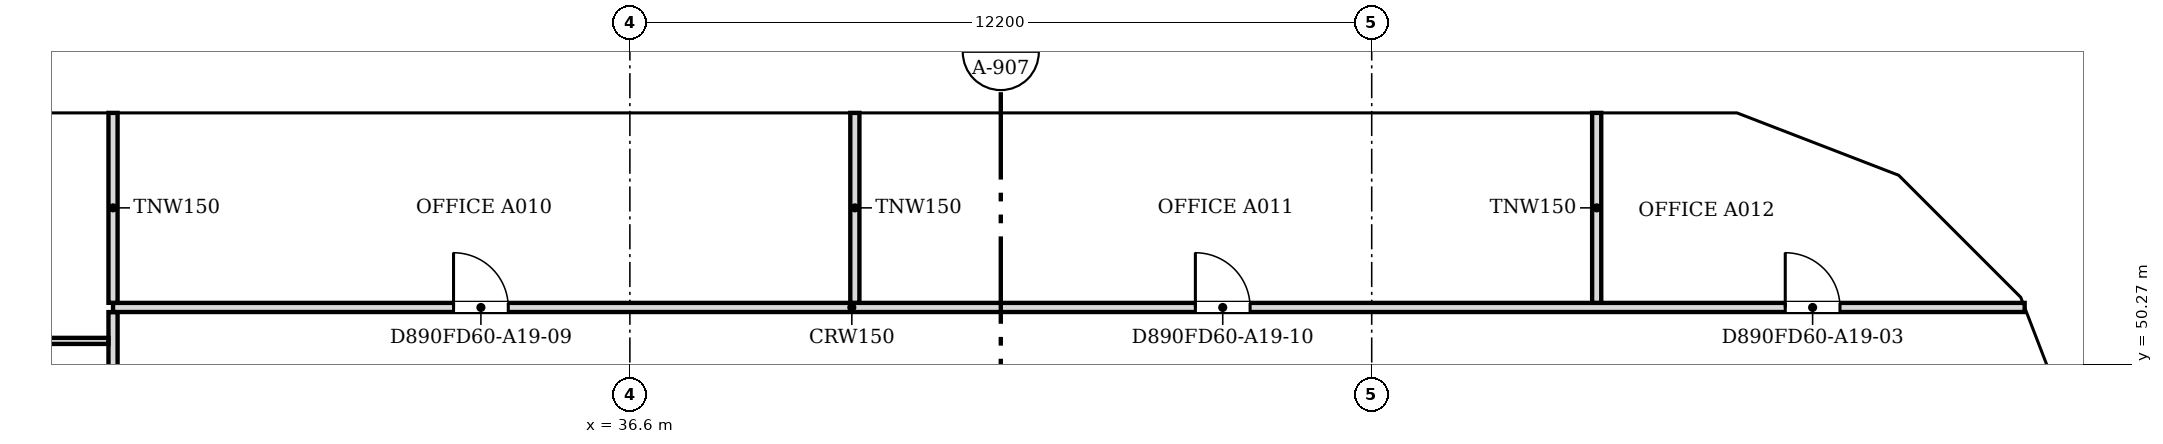
"""IFC4 building model, lengths in metres.
Left out: names, types, materials, properties, quantities, classifications, styles, units other than length and angle.
Written with IfcOpenShell. Run it as: python <this file> out.ifc"""

import sys

from ifc_helpers import new_model, si_unit, direction, frame, frame_2d, origin, place, context, subcontext, project, spatial, polyline, rectangle, outline, extrude, faceted_brep, source, transform, mapped, element, fill, save


model = new_model("IFC4")
c1 = context("Model", 3, precision=1e-05, world=origin(), true_north=direction((0.0, 1.0)))
c2 = subcontext(c1, "Body", "Model", "MODEL_VIEW")
j1 = project(units=[si_unit("LENGTHUNIT", "METRE"), si_unit("PLANEANGLEUNIT", "RADIAN")], contexts=[c1])
p1 = place(None, origin())
s1 = spatial("IfcSite", under=j1, at=p1, CompositionType="ELEMENT")
p2 = place(p1, origin())
s2 = spatial("IfcBuilding", under=s1, at=p2, CompositionType="ELEMENT")
p3 = place(p2, frame((0.0, 0.0, 216.9)))
s3 = spatial("IfcBuildingStorey", under=s2, at=p3, CompositionType="ELEMENT", Elevation=216.9)
m1 = source(origin(), c2, "Body", "Brep", [
    faceted_brep([(0.047, -0.25, 0.0), (2.997, -0.25, 3.8), (0.047, -0.25, 7.6), (0.0, -0.25, 7.541), (0.0, -0.25, 0.059), (0.093, 0.25, 7.54), (2.944, 0.25, 3.868), (2.944, 0.25, 3.732), (0.093, 0.25, 0.06), (2.997, 0.0, 3.8), (0.047, 0.0, 0.0), (0.047, 0.0, 7.6)], [[[0, 1, 2, 3, 4]], [[5, 6, 7, 8]], [[8, 7, 9, 1, 0, 10]], [[6, 5, 11, 2, 1, 9]], [[3, 2, 11]], [[10, 0, 4]], [[8, 10, 4, 3, 11, 5]], [[9, 7, 6]]]),
])
p4 = place(p3, frame((60.767, 48.71, -3.8), z_axis=(0.0, 0.0, 1.0), x_axis=(-0.359901446078, 0.932990326376, 0.0)))
e1 = element("IfcWall", 1, at=p4, inside=s3, PredefinedType="SOLIDWALL", context=c2, shape_type="MappedRepresentation", body=[
    mapped(m1, transform((0.0, 0.0, 0.0), scale=1.0)),
])
m2 = source(origin(), c2, "Body", "SweptSolid", [
    extrude(outline(polyline([(0.247, 0.665), (2.681, 3.8), (0.247, 6.935), (0.247, 0.665)])), frame((0.0, 0.26, 0.0), z_axis=(0.0, -1.0, 0.0), x_axis=(1.0, 0.0, 0.0)), (0.0, 0.0, 1.0), 0.52),
])
p5 = place(p4, origin())
e2 = element("IfcOpeningElement", 2, at=p5, cuts=e1, PredefinedType="OPENING", context=c2, shape_type="MappedRepresentation", body=[
    mapped(m2, transform((0.0, 0.0, 0.0), scale=1.0)),
])
m3 = source(origin(), c2, "Body", "Brep", [
    faceted_brep([(2.944, -0.25, 0.0), (2.997, -0.25, 0.068), (2.997, -0.25, 7.532), (2.944, -0.25, 7.6), (0.0, -0.25, 3.8), (0.053, 0.25, 3.868), (2.891, 0.25, 7.532), (2.891, 0.25, 0.068), (0.053, 0.25, 3.731), (2.944, 0.0, 0.0), (2.944, 0.0, 7.6), (0.0, 0.0, 3.8)], [[[0, 1, 2, 3, 4]], [[5, 6, 7, 8]], [[1, 0, 9]], [[10, 3, 2]], [[6, 5, 11, 4, 3, 10]], [[8, 7, 9, 0, 4, 11]], [[8, 11, 5]], [[1, 9, 7, 6, 10, 2]]]),
])
p6 = place(p3, frame((59.688, 51.506, -3.8), z_axis=(0.0, 0.0, 1.0), x_axis=(-0.707106781187, 0.707106781187, 0.0)))
e3 = element("IfcWall", 3, at=p6, inside=s3, PredefinedType="SOLIDWALL", context=c2, shape_type="MappedRepresentation", body=[
    mapped(m3, transform((0.0, 0.0, 0.0), scale=1.0)),
])
m4 = source(origin(), c2, "Body", "SweptSolid", [
    extrude(outline(polyline([(2.744, 6.934), (0.316, 3.8), (2.744, 0.666), (2.744, 6.934)])), frame((0.0, 0.26, 0.0), z_axis=(0.0, -1.0, 0.0), x_axis=(1.0, 0.0, 0.0)), (0.0, 0.0, 1.0), 0.52),
])
p7 = place(p6, origin())
e4 = element("IfcOpeningElement", 4, at=p7, cuts=e3, PredefinedType="OPENING", context=c2, shape_type="MappedRepresentation", body=[
    mapped(m4, transform((0.0, 0.0, 0.0), scale=1.0)),
])
m5 = source(origin(), c2, "Body", "Brep", [
    faceted_brep([(0.053, -0.25, 0.0), (3.003, -0.25, 3.8), (0.053, -0.25, 7.6), (0.0, -0.25, 7.531), (0.0, -0.25, 0.068), (0.106, 0.25, 7.532), (2.957, 0.25, 3.86), (2.957, 0.25, 3.74), (0.106, 0.25, 0.068), (3.003, 0.0, 3.8), (0.053, 0.0, 0.0), (0.053, 0.0, 7.6)], [[[0, 1, 2, 3, 4]], [[5, 6, 7, 8]], [[8, 7, 9, 1, 0, 10]], [[6, 5, 11, 2, 1, 9]], [[3, 2, 11]], [[10, 0, 4]], [[8, 10, 4, 3, 11, 5]], [[9, 7, 6]]]),
])
p8 = place(p3, frame((57.656, 53.569, -3.8), z_axis=(0.0, 0.0, 1.0), x_axis=(-0.933007896601, 0.359855894603, 0.0)))
e5 = element("IfcWall", 5, at=p8, inside=s3, PredefinedType="SOLIDWALL", context=c2, shape_type="MappedRepresentation", body=[
    mapped(m5, transform((0.0, 0.0, 0.0), scale=1.0)),
])
m6 = source(origin(), c2, "Body", "SweptSolid", [
    extrude(outline(polyline([(0.253, 0.665), (2.687, 3.8), (0.253, 6.935), (0.253, 0.665)])), frame((0.0, 0.26, 0.0), z_axis=(0.0, -1.0, 0.0), x_axis=(1.0, 0.0, 0.0)), (0.0, 0.0, 1.0), 0.52),
])
p9 = place(p8, origin())
e6 = element("IfcOpeningElement", 6, at=p9, cuts=e5, PredefinedType="OPENING", context=c2, shape_type="MappedRepresentation", body=[
    mapped(m6, transform((0.0, 0.0, 0.0), scale=1.0)),
])
m7 = source(origin(), c2, "Body", "Brep", [
    faceted_brep([(3.003, -0.25, 0.0), (6.053, -0.25, 3.8), (3.003, -0.25, 7.6), (0.0, -0.25, 3.8), (0.047, 0.25, 3.859), (3.003, 0.25, 7.6), (6.053, 0.25, 3.8), (3.003, 0.25, 0.0), (0.047, 0.25, 3.741), (0.0, 0.0, 3.8)], [[[0, 1, 2, 3]], [[4, 5, 6, 7, 8]], [[7, 6, 1, 0]], [[6, 5, 2, 1]], [[5, 4, 9, 3, 2]], [[8, 7, 0, 3, 9]], [[8, 9, 4]]]),
])
p10 = place(p3, frame((54.854, 54.65, -3.8), z_axis=(0.0, 0.0, 1.0), x_axis=(-1.0, 0.0, 0.0)))
e7 = element("IfcWall", 7, at=p10, inside=s3, PredefinedType="SOLIDWALL", context=c2, shape_type="MappedRepresentation", body=[
    mapped(m7, transform((0.0, 0.0, 0.0), scale=1.0)),
])
m8 = source(origin(), c2, "Body", "SweptSolid", [
    extrude(outline(polyline([(3.005, 0.401), (5.733, 3.8), (3.005, 7.199), (0.319, 3.8), (3.005, 0.401)])), frame((0.0, 0.26, 0.0), z_axis=(0.0, -1.0, 0.0), x_axis=(1.0, 0.0, 0.0)), (0.0, 0.0, 1.0), 0.52),
])
p11 = place(p10, origin())
e8 = element("IfcOpeningElement", 8, at=p11, cuts=e7, PredefinedType="OPENING", context=c2, shape_type="MappedRepresentation", body=[
    mapped(m8, transform((0.0, 0.0, 0.0), scale=1.0)),
])
m9 = source(origin(), c2, "Body", "SweptSolid", [
    extrude(outline(polyline([(3.05, 0.0), (6.1, 3.8), (3.05, 7.6), (0.0, 3.8), (3.05, 0.0)])), frame((0.0, 0.25, 0.0), z_axis=(0.0, -1.0, 0.0), x_axis=(1.0, 0.0, 0.0)), (0.0, 0.0, 1.0), 0.5),
])
p12 = place(p3, frame((48.8, 54.65, -3.8), z_axis=(0.0, 0.0, 1.0), x_axis=(-1.0, 0.0, 0.0)))
e9 = element("IfcWall", 9, at=p12, inside=s3, PredefinedType="SOLIDWALL", context=c2, shape_type="MappedRepresentation", body=[
    mapped(m9, transform((0.0, 0.0, 0.0), scale=1.0)),
])
m10 = source(origin(), c2, "Body", "SweptSolid", [
    extrude(outline(polyline([(3.05, 0.399), (5.78, 3.8), (3.05, 7.2), (0.321, 3.8), (3.05, 0.399)])), frame((0.0, 0.26, 0.0), z_axis=(0.0, -1.0, 0.0), x_axis=(1.0, 0.0, 0.0)), (0.0, 0.0, 1.0), 0.52),
])
p13 = place(p12, origin())
e10 = element("IfcOpeningElement", 10, at=p13, cuts=e9, PredefinedType="OPENING", context=c2, shape_type="MappedRepresentation", body=[
    mapped(m10, transform((0.0, 0.0, 0.0), scale=1.0)),
])
m11 = source(origin(), c2, "Body", "Brep", [
    faceted_brep([(3.05, -0.25, 0.0), (6.1, -0.25, 3.8), (6.1, -0.25, 3.8), (3.05, -0.25, 7.6), (0.0, -0.25, 3.8), (0.0, 0.25, 3.8), (3.05, 0.25, 7.6), (6.1, 0.25, 3.8), (6.1, 0.25, 3.8), (3.05, 0.25, 0.0)], [[[0, 1, 2, 3, 4]], [[5, 6, 7, 8, 9]], [[9, 8, 1, 0]], [[7, 6, 3, 2]], [[6, 5, 4, 3]], [[5, 9, 0, 4]], [[1, 8, 7, 2]]]),
])
p14 = place(p3, frame((42.7, 54.65, -3.8), z_axis=(0.0, 0.0, 1.0), x_axis=(-1.0, 0.0, 0.0)))
e11 = element("IfcWall", 11, at=p14, inside=s3, PredefinedType="SOLIDWALL", context=c2, shape_type="MappedRepresentation", body=[
    mapped(m11, transform((0.0, 0.0, 0.0), scale=1.0)),
])
p15 = place(p14, origin())
e12 = element("IfcOpeningElement", 12, at=p15, cuts=e11, PredefinedType="OPENING", context=c2, shape_type="MappedRepresentation", body=[
    mapped(m10, transform((0.0, 0.0, 0.0), scale=1.0)),
])
p16 = place(p3, frame((36.6, 54.65, -3.8), z_axis=(0.0, 0.0, 1.0), x_axis=(-1.0, 0.0, 0.0)))
e13 = element("IfcWall", 13, at=p16, inside=s3, PredefinedType="SOLIDWALL", context=c2, shape_type="MappedRepresentation", body=[
    mapped(m9, transform((0.0, 0.0, 0.0), scale=1.0)),
])
p17 = place(p16, origin())
e14 = element("IfcOpeningElement", 14, at=p17, cuts=e13, PredefinedType="OPENING", context=c2, shape_type="MappedRepresentation", body=[
    mapped(m10, transform((0.0, 0.0, 0.0), scale=1.0)),
])
p18 = place(p3, frame((30.5, 54.65, -3.8), z_axis=(0.0, 0.0, 1.0), x_axis=(-1.0, 0.0, 0.0)))
e15 = element("IfcWall", 15, at=p18, inside=s3, PredefinedType="SOLIDWALL", context=c2, shape_type="MappedRepresentation", body=[
    mapped(m9, transform((0.0, 0.0, 0.0), scale=1.0)),
])
p19 = place(p18, origin())
e16 = element("IfcOpeningElement", 16, at=p19, cuts=e15, PredefinedType="OPENING", context=c2, shape_type="MappedRepresentation", body=[
    mapped(m10, transform((0.0, 0.0, 0.0), scale=1.0)),
])
p20 = place(p2, frame((0.0, 0.0, 220.7)))
s4 = spatial("IfcBuildingStorey", under=s2, at=p20, CompositionType="ELEMENT", Elevation=220.7)
m12 = source(origin(), c2, "Body", "Brep", [
    faceted_brep([(2.95, -0.25, 0.0), (3.003, -0.25, 0.068), (3.003, -0.25, 7.532), (2.95, -0.25, 7.6), (0.0, -0.25, 3.8), (0.047, 0.25, 3.86), (2.898, 0.25, 7.532), (2.898, 0.25, 0.068), (0.047, 0.25, 3.74), (2.95, 0.0, 0.0), (2.95, 0.0, 7.6), (0.0, 0.0, 3.8)], [[[0, 1, 2, 3, 4]], [[5, 6, 7, 8]], [[1, 0, 9]], [[10, 3, 2]], [[6, 5, 11, 4, 3, 10]], [[8, 7, 9, 0, 4, 11]], [[8, 11, 5]], [[1, 9, 7, 6, 10, 2]]]),
])
p21 = place(p20, frame((60.75, 48.753, -3.8), z_axis=(0.0, 0.0, 1.0), x_axis=(-0.35992665181, 0.932980602862, 0.0)))
e17 = element("IfcWall", 17, at=p21, inside=s4, PredefinedType="SOLIDWALL", context=c2, shape_type="MappedRepresentation", body=[
    mapped(m12, transform((0.0, 0.0, 0.0), scale=1.0)),
])
m13 = source(origin(), c2, "Body", "SweptSolid", [
    extrude(outline(polyline([(2.75, 6.935), (0.316, 3.8), (2.75, 0.665), (2.75, 6.935)])), frame((0.0, 0.26, 0.0), z_axis=(0.0, -1.0, 0.0), x_axis=(1.0, 0.0, 0.0)), (0.0, 0.0, 1.0), 0.52),
])
p22 = place(p21, origin())
e18 = element("IfcOpeningElement", 18, at=p22, cuts=e17, PredefinedType="OPENING", context=c2, shape_type="MappedRepresentation", body=[
    mapped(m13, transform((0.0, 0.0, 0.0), scale=1.0)),
])
m14 = source(origin(), c2, "Body", "Brep", [
    faceted_brep([(0.053, -0.25, 0.0), (2.997, -0.25, 3.8), (0.053, -0.25, 7.6), (0.0, -0.25, 7.532), (0.0, -0.25, 0.068), (0.106, 0.25, 7.532), (2.944, 0.25, 3.868), (2.944, 0.25, 3.732), (0.106, 0.25, 0.068), (2.997, 0.0, 3.8), (0.053, 0.0, 0.0), (0.053, 0.0, 7.6)], [[[0, 1, 2, 3, 4]], [[5, 6, 7, 8]], [[8, 7, 9, 1, 0, 10]], [[6, 5, 11, 2, 1, 9]], [[3, 2, 11]], [[10, 0, 4]], [[8, 10, 4, 3, 11, 5]], [[9, 7, 6]]]),
])
p23 = place(p20, frame((59.726, 51.469, -3.8), z_axis=(0.0, 0.0, 1.0), x_axis=(-0.707106781187, 0.707106781187, 0.0)))
e19 = element("IfcWall", 19, at=p23, inside=s4, PredefinedType="SOLIDWALL", context=c2, shape_type="MappedRepresentation", body=[
    mapped(m14, transform((0.0, 0.0, 0.0), scale=1.0)),
])
m15 = source(origin(), c2, "Body", "SweptSolid", [
    extrude(outline(polyline([(0.253, 0.667), (2.681, 3.8), (0.253, 6.934), (0.253, 0.667)])), frame((0.0, 0.26, 0.0), z_axis=(0.0, -1.0, 0.0), x_axis=(1.0, 0.0, 0.0)), (0.0, 0.0, 1.0), 0.52),
])
p24 = place(p23, origin())
e20 = element("IfcOpeningElement", 20, at=p24, cuts=e19, PredefinedType="OPENING", context=c2, shape_type="MappedRepresentation", body=[
    mapped(m15, transform((0.0, 0.0, 0.0), scale=1.0)),
])
m16 = source(origin(), c2, "Body", "Brep", [
    faceted_brep([(2.95, -0.25, 0.0), (2.997, -0.25, 0.059), (2.997, -0.25, 7.541), (2.95, -0.25, 7.6), (0.0, -0.25, 3.8), (0.053, 0.25, 3.868), (2.904, 0.25, 7.54), (2.904, 0.25, 0.06), (0.053, 0.25, 3.732), (2.95, 0.0, 0.0), (2.95, 0.0, 7.6), (0.0, 0.0, 3.8)], [[[0, 1, 2, 3, 4]], [[5, 6, 7, 8]], [[1, 0, 9]], [[10, 3, 2]], [[6, 5, 11, 4, 3, 10]], [[8, 7, 9, 0, 4, 11]], [[8, 11, 5]], [[1, 9, 7, 6, 10, 2]]]),
])
p25 = place(p20, frame((57.606, 53.588, -3.8), z_axis=(0.0, 0.0, 1.0), x_axis=(-0.932990326376, 0.359901446078, 0.0)))
e21 = element("IfcWall", 21, at=p25, inside=s4, PredefinedType="SOLIDWALL", context=c2, shape_type="MappedRepresentation", body=[
    mapped(m16, transform((0.0, 0.0, 0.0), scale=1.0)),
])
p26 = place(p25, origin())
e22 = element("IfcOpeningElement", 22, at=p26, cuts=e21, PredefinedType="OPENING", context=c2, shape_type="MappedRepresentation", body=[
    mapped(m13, transform((0.0, 0.0, 0.0), scale=1.0)),
])
m17 = source(origin(), c2, "Body", "Brep", [
    faceted_brep([(0.047, -0.25, 0.0), (3.05, -0.25, 3.8), (0.047, -0.25, 7.6), (0.0, -0.25, 7.54), (0.0, -0.25, 0.06), (0.093, 0.25, 7.541), (3.05, 0.25, 3.8), (0.093, 0.25, 0.059), (0.047, 0.0, 0.0), (0.047, 0.0, 7.6)], [[[0, 1, 2, 3, 4]], [[5, 6, 7]], [[7, 6, 1, 0, 8]], [[6, 5, 9, 2, 1]], [[3, 2, 9]], [[8, 0, 4]], [[7, 8, 4, 3, 9, 5]]]),
])
p27 = place(p20, frame((54.9, 54.65, -3.8), z_axis=(0.0, 0.0, 1.0), x_axis=(-1.0, 0.0, 0.0)))
e23 = element("IfcWall", 23, at=p27, inside=s4, PredefinedType="SOLIDWALL", context=c2, shape_type="MappedRepresentation", body=[
    mapped(m17, transform((0.0, 0.0, 0.0), scale=1.0)),
])
m18 = source(origin(), c2, "Body", "SweptSolid", [
    extrude(outline(polyline([(0.247, 0.656), (2.731, 3.8), (0.247, 6.944), (0.247, 0.656)])), frame((0.0, 0.26, 0.0), z_axis=(0.0, -1.0, 0.0), x_axis=(1.0, 0.0, 0.0)), (0.0, 0.0, 1.0), 0.52),
])
p28 = place(p27, origin())
e24 = element("IfcOpeningElement", 24, at=p28, cuts=e23, PredefinedType="OPENING", context=c2, shape_type="MappedRepresentation", body=[
    mapped(m18, transform((0.0, 0.0, 0.0), scale=1.0)),
])
m19 = source(origin(), c2, "Body", "SweptSolid", [
    extrude(outline(polyline([(3.05, 0.0), (6.1, 3.8), (3.05, 7.6), (0.0, 3.8), (3.05, 0.0)])), frame((0.0, 0.25, 0.0), z_axis=(0.0, -1.0, 0.0), x_axis=(1.0, 0.0, 0.0)), (0.0, 0.0, 1.0), 0.5),
])
p29 = place(p20, frame((51.85, 54.65, -3.8), z_axis=(0.0, 0.0, 1.0), x_axis=(-1.0, 0.0, 0.0)))
e25 = element("IfcWall", 25, at=p29, inside=s4, PredefinedType="SOLIDWALL", context=c2, shape_type="MappedRepresentation", body=[
    mapped(m19, transform((0.0, 0.0, 0.0), scale=1.0)),
])
m20 = source(origin(), c2, "Body", "SweptSolid", [
    extrude(outline(polyline([(3.05, 0.399), (5.78, 3.8), (3.05, 7.201), (0.321, 3.8), (3.05, 0.399)])), frame((0.0, 0.26, 0.0), z_axis=(0.0, -1.0, 0.0), x_axis=(1.0, 0.0, 0.0)), (0.0, 0.0, 1.0), 0.52),
])
p30 = place(p29, origin())
e26 = element("IfcOpeningElement", 26, at=p30, cuts=e25, PredefinedType="OPENING", context=c2, shape_type="MappedRepresentation", body=[
    mapped(m20, transform((0.0, 0.0, 0.0), scale=1.0)),
])
p31 = place(p20, frame((45.75, 54.65, -3.8), z_axis=(0.0, 0.0, 1.0), x_axis=(-1.0, 0.0, 0.0)))
e27 = element("IfcWall", 27, at=p31, inside=s4, PredefinedType="SOLIDWALL", context=c2, shape_type="MappedRepresentation", body=[
    mapped(m19, transform((0.0, 0.0, 0.0), scale=1.0)),
])
p32 = place(p31, origin())
e28 = element("IfcOpeningElement", 28, at=p32, cuts=e27, PredefinedType="OPENING", context=c2, shape_type="MappedRepresentation", body=[
    mapped(m20, transform((0.0, 0.0, 0.0), scale=1.0)),
])
m21 = source(origin(), c2, "Body", "Brep", [
    faceted_brep([(3.05, -0.25, 0.0), (6.1, -0.25, 3.8), (6.1, -0.25, 3.8), (3.05, -0.25, 7.6), (0.0, -0.25, 3.8), (0.0, 0.25, 3.8), (3.05, 0.25, 7.6), (6.1, 0.25, 3.8), (6.1, 0.25, 3.8), (3.05, 0.25, 0.0)], [[[0, 1, 2, 3, 4]], [[5, 6, 7, 8, 9]], [[9, 8, 1, 0]], [[7, 6, 3, 2]], [[6, 5, 4, 3]], [[5, 9, 0, 4]], [[1, 8, 7, 2]]]),
])
p33 = place(p20, frame((39.65, 54.65, -3.8), z_axis=(0.0, 0.0, 1.0), x_axis=(-1.0, 0.0, 0.0)))
e29 = element("IfcWall", 29, at=p33, inside=s4, PredefinedType="SOLIDWALL", context=c2, shape_type="MappedRepresentation", body=[
    mapped(m21, transform((0.0, 0.0, 0.0), scale=1.0)),
])
p34 = place(p33, origin())
e30 = element("IfcOpeningElement", 30, at=p34, cuts=e29, PredefinedType="OPENING", context=c2, shape_type="MappedRepresentation", body=[
    mapped(m20, transform((0.0, 0.0, 0.0), scale=1.0)),
])
p35 = place(p20, frame((33.55, 54.65, -3.8), z_axis=(0.0, 0.0, 1.0), x_axis=(-1.0, 0.0, 0.0)))
e31 = element("IfcWall", 31, at=p35, inside=s4, PredefinedType="SOLIDWALL", context=c2, shape_type="MappedRepresentation", body=[
    mapped(m19, transform((0.0, 0.0, 0.0), scale=1.0)),
])
p36 = place(p35, origin())
e32 = element("IfcOpeningElement", 32, at=p36, cuts=e31, PredefinedType="OPENING", context=c2, shape_type="MappedRepresentation", body=[
    mapped(m20, transform((0.0, 0.0, 0.0), scale=1.0)),
])
p37 = place(p20, frame((27.45, 54.65, -3.8), z_axis=(0.0, 0.0, 1.0), x_axis=(-1.0, 0.0, 0.0)))
e33 = element("IfcWall", 33, at=p37, inside=s4, PredefinedType="SOLIDWALL", context=c2, shape_type="MappedRepresentation", body=[
    mapped(m21, transform((0.0, 0.0, 0.0), scale=1.0)),
])
p38 = place(p37, origin())
e34 = element("IfcOpeningElement", 34, at=p38, cuts=e33, PredefinedType="OPENING", context=c2, shape_type="MappedRepresentation", body=[
    mapped(m20, transform((0.0, 0.0, 0.0), scale=1.0)),
])
p39 = place(p3, frame((28.1, 47.376, 0.0), z_axis=(0.0, 0.0, 1.0), x_axis=(0.0, 1.0, 0.0)))
e35 = element("IfcWall", 35, at=p39, inside=s3, PredefinedType="PARTITIONING", context=c2, shape_type="SweptSolid", body=[
    extrude(rectangle(XDim=3.748, YDim=0.15, at=frame_2d((1.874, 0.0))), origin(), (0.0, 0.0, 1.0), 3.067),
])
p40 = place(p3, frame((19.776, 50.65, 0.0), z_axis=(0.0, 0.0, 1.0), x_axis=(1.0, 0.0, 0.0)))
e36 = element("IfcWall", 36, at=p40, inside=s3, PredefinedType="PARTITIONING", context=c2, shape_type="SweptSolid", body=[
    extrude(rectangle(XDim=8.248, YDim=0.1, at=frame_2d((4.124, 0.0))), origin(), (0.0, 0.0, 1.0), 3.067),
])
m22 = source(origin(), c2, "Body", "SweptSolid", [
    extrude(rectangle(XDim=0.9, YDim=2.1, at=frame_2d((0.45, 1.05))), frame((0.0, 0.06, 0.0), z_axis=(0.0, -1.0, 0.0), x_axis=(1.0, 0.0, 0.0)), (0.0, 0.0, 1.0), 0.12),
])
p41 = place(p40, frame((3.7, 0.0, 0.0)))
e37 = element("IfcOpeningElement", 37, at=p41, cuts=e36, PredefinedType="OPENING", context=c2, shape_type="MappedRepresentation", body=[
    mapped(m22, transform((0.0, 0.0, 0.0), scale=1.0)),
])
p42 = place(p3, frame((28.1, 51.2, 0.0), z_axis=(0.0, 0.0, 1.0), x_axis=(1.0, 0.0, 0.0)))
e38 = element("IfcWall", 38, at=p42, inside=s3, PredefinedType="PARTITIONING", context=c2, shape_type="SweptSolid", body=[
    extrude(rectangle(XDim=31.438, YDim=0.15, at=frame_2d((15.719, 0.0))), origin(), (0.0, 0.0, 1.0), 3.067),
])
m23 = source(origin(), c2, "Body", "SweptSolid", [
    extrude(rectangle(XDim=0.9, YDim=2.1, at=frame_2d((0.45, 1.05))), frame((0.0, 0.085, 0.0), z_axis=(0.0, -1.0, 0.0), x_axis=(1.0, 0.0, 0.0)), (0.0, 0.0, 1.0), 0.17),
])
p43 = place(p42, frame((27.501, 0.0, 0.0)))
e39 = element("IfcOpeningElement", 39, at=p43, cuts=e38, PredefinedType="OPENING", context=c2, shape_type="MappedRepresentation", body=[
    mapped(m23, transform((0.0, 0.0, 0.0), scale=1.0)),
])
p44 = place(p42, frame((5.6, 0.0, 0.0)))
e40 = element("IfcOpeningElement", 40, at=p44, cuts=e38, PredefinedType="OPENING", context=c2, shape_type="MappedRepresentation", body=[
    mapped(m23, transform((0.0, 0.0, 0.0), scale=1.0)),
])
p45 = place(p42, frame((17.8, 0.0, 0.0)))
e41 = element("IfcOpeningElement", 41, at=p45, cuts=e38, PredefinedType="OPENING", context=c2, shape_type="MappedRepresentation", body=[
    mapped(m23, transform((0.0, 0.0, 0.0), scale=1.0)),
])
for number, where, z_axis, x_axis in (
    (42, (28.1, 51.276, 0.0), (0.0, 0.0, 1.0), (0.0, 1.0, 0.0)),
    (43, (40.3, 51.276, 0.0), (0.0, 0.0, 1.0), (0.0, 1.0, 0.0)),
    (44, (52.5, 51.276, 0.0), (0.0, 0.0, 1.0), (0.0, 1.0, 0.0)),
):
    element("IfcWall", number, at=place(p3, frame(where, z_axis=z_axis, x_axis=x_axis)), inside=s3, PredefinedType="PARTITIONING", context=c2, shape_type="SweptSolid", body=[
        extrude(rectangle(XDim=3.124, YDim=0.15, at=frame_2d((1.562, 0.0))), origin(), (0.0, 0.0, 1.0), 3.067),
    ])
m24 = source(origin(), c2, "Body", "SweptSolid", [
    extrude(rectangle(XDim=0.9, YDim=2.1, at=frame_2d((0.45, 1.05))), frame((0.0, 0.025, 0.0), z_axis=(0.0, -1.0, 0.0), x_axis=(1.0, 0.0, 0.0)), (0.0, 0.0, 1.0), 0.05),
])
p46 = place(p43, origin())
e45 = element("IfcDoor", 45, at=p46, inside=s3, OperationType="SINGLE_SWING_LEFT", PredefinedType="DOOR", context=c2, shape_type="MappedRepresentation", body=[
    mapped(m24, transform((0.0, 0.0, 0.0), scale=1.0)),
])
fill(e39, e45)
p47 = place(p44, origin())
e46 = element("IfcDoor", 46, at=p47, inside=s3, OperationType="SINGLE_SWING_LEFT", PredefinedType="DOOR", context=c2, shape_type="MappedRepresentation", body=[
    mapped(m24, transform((0.0, 0.0, 0.0), scale=1.0)),
])
fill(e40, e46)
p48 = place(p45, origin())
e47 = element("IfcDoor", 47, at=p48, inside=s3, OperationType="SINGLE_SWING_LEFT", PredefinedType="DOOR", context=c2, shape_type="MappedRepresentation", body=[
    mapped(m24, transform((0.0, 0.0, 0.0), scale=1.0)),
])
fill(e41, e47)
save(model, sys.argv[1])
